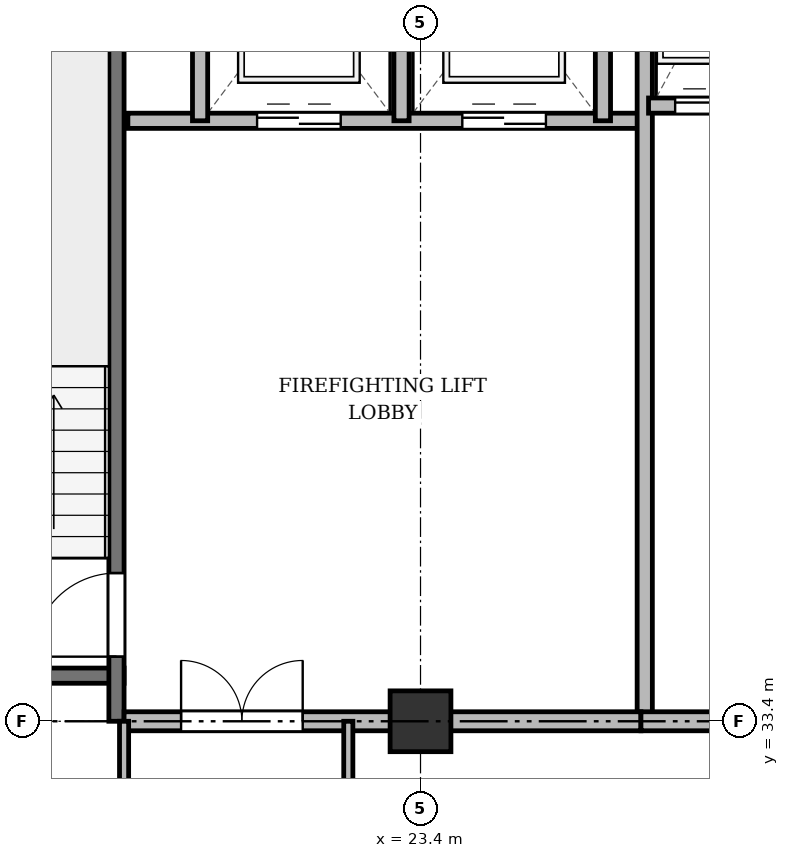
"""IFC4 building model, lengths in metres.
Left out: names, types, materials, properties, quantities, classifications, styles, units other than length and angle.
Written with IfcOpenShell. Run it as: python <this file> out.ifc"""

import sys

from ifc_helpers import new_model, si_unit, direction, frame, frame_2d, origin, origin_2d, place, context, subcontext, project, spatial, rectangle, extrude, source, transform, mapped, element, fill, save


model = new_model("IFC4")
c1 = context("Model", 3, precision=1e-05, world=origin(), true_north=direction((0.0, 1.0)))
c2 = subcontext(c1, "Body", "Model", "MODEL_VIEW")
j1 = project(units=[si_unit("LENGTHUNIT", "METRE"), si_unit("PLANEANGLEUNIT", "RADIAN")], contexts=[c1])
p1 = place(None, origin())
s1 = spatial("IfcSite", under=j1, at=p1, CompositionType="ELEMENT")
p2 = place(p1, origin())
s2 = spatial("IfcBuilding", under=s1, at=p2, CompositionType="ELEMENT")
p3 = place(p2, frame((0.0, 0.0, 106.9)))
s3 = spatial("IfcBuildingStorey", under=s2, at=p3, CompositionType="ELEMENT", Elevation=106.9)
m1 = source(origin(), c2, "Body", "SweptSolid", [
    extrude(rectangle(XDim=0.8, YDim=0.8, at=origin_2d()), origin(), (0.0, 0.0, 1.0), 3.6),
])
p4 = place(p3, frame((23.4, 33.4, 0.0), z_axis=(0.0, 0.0, 1.0), x_axis=(1.0, 0.0, 0.0)))
e1 = element("IfcColumn", 1, at=p4, inside=s3, PredefinedType="COLUMN", context=c2, shape_type="MappedRepresentation", body=[
    mapped(m1, transform((0.0, 0.0, 0.0), x_axis=(1.0, 0.0, 0.0), y_axis=(0.0, 1.0, 0.0), z_axis=(0.0, 0.0, 1.0), scale=1.0)),
])
p5 = place(p3, frame((16.1, 34.0, 0.0), z_axis=(0.0, 0.0, 1.0), x_axis=(1.0, 0.0, 0.0)))
e2 = element("IfcWall", 2, at=p5, inside=s3, PredefinedType="SHEAR", context=c2, shape_type="SweptSolid", body=[
    extrude(rectangle(XDim=3.4, YDim=0.2, at=frame_2d((1.7, 0.0))), origin(), (0.0, 0.0, 1.0), 3.34),
])
p6 = place(p3, frame((19.4, 33.4, 0.0), z_axis=(0.0, 0.0, 1.0), x_axis=(0.0, 1.0, 0.0)))
e3 = element("IfcWall", 3, at=p6, inside=s3, PredefinedType="SHEAR", context=c2, shape_type="SweptSolid", body=[
    extrude(rectangle(XDim=11.1, YDim=0.2, at=frame_2d((5.55, 0.0))), origin(), (0.0, 0.0, 1.0), 3.34),
])
p7 = place(p6, frame((0.85, 0.0, 0.0)))
e4 = element("IfcOpeningElement", 4, at=p7, cuts=e3, PredefinedType="OPENING", context=c2, shape_type="SweptSolid", body=[
    extrude(rectangle(XDim=1.1, YDim=2.15, at=frame_2d((0.55, 1.075))), frame((0.0, 0.11, 0.0), z_axis=(0.0, -1.0, 0.0), x_axis=(1.0, 0.0, 0.0)), (0.0, 0.0, 1.0), 0.22),
])
p8 = place(p3, frame((19.55, 41.3, 0.0), z_axis=(0.0, 0.0, 1.0), x_axis=(1.0, 0.0, 0.0)))
e5 = element("IfcWall", 5, at=p8, inside=s3, PredefinedType="SOLIDWALL", context=c2, shape_type="SweptSolid", body=[
    extrude(rectangle(XDim=6.75, YDim=0.2, at=frame_2d((3.375, 0.0))), origin(), (0.0, 0.0, 1.0), 3.34),
])
p9 = place(p8, frame((1.7, 0.0, 0.0)))
e6 = element("IfcOpeningElement", 6, at=p9, cuts=e5, PredefinedType="OPENING", context=c2, shape_type="SweptSolid", body=[
    extrude(rectangle(XDim=1.1, YDim=2.15, at=frame_2d((0.55, 1.075))), frame((0.0, 0.11, 0.0), z_axis=(0.0, -1.0, 0.0), x_axis=(1.0, 0.0, 0.0)), (0.0, 0.0, 1.0), 0.22),
])
p10 = place(p8, frame((4.4, 0.0, 0.0)))
e7 = element("IfcOpeningElement", 7, at=p10, cuts=e5, PredefinedType="OPENING", context=c2, shape_type="SweptSolid", body=[
    extrude(rectangle(XDim=1.1, YDim=2.15, at=frame_2d((0.55, 1.075))), frame((0.0, 0.11, 0.0), z_axis=(0.0, -1.0, 0.0), x_axis=(1.0, 0.0, 0.0)), (0.0, 0.0, 1.0), 0.22),
])
for number, where, z_axis, x_axis in (
    (8, (20.5, 41.3, 0.0), (0.0, 0.0, 1.0), (0.0, 1.0, 0.0)),
    (9, (23.15, 41.3, 0.0), (0.0, 0.0, 1.0), (0.0, 1.0, 0.0)),
    (10, (25.8, 41.3, 0.0), (0.0, 0.0, 1.0), (0.0, 1.0, 0.0)),
):
    element("IfcWall", number, at=place(p3, frame(where, z_axis=z_axis, x_axis=x_axis)), inside=s3, PredefinedType="SOLIDWALL", context=c2, shape_type="SweptSolid", body=[
        extrude(rectangle(XDim=3.4, YDim=0.2, at=frame_2d((1.7, 0.0))), origin(), (0.0, 0.0, 1.0), 3.34),
    ])
p11 = place(p3, frame((26.35, 33.4, 0.0), z_axis=(0.0, 0.0, 1.0), x_axis=(0.0, 1.0, 0.0)))
e11 = element("IfcWall", 11, at=p11, inside=s3, PredefinedType="SOLIDWALL", context=c2, shape_type="SweptSolid", body=[
    extrude(rectangle(XDim=11.3, YDim=0.2, at=frame_2d((5.65, 0.0))), origin(), (0.0, 0.0, 1.0), 2.752),
])
p12 = place(p3, frame((19.5, 33.4, 0.0), z_axis=(0.0, 0.0, 1.0), x_axis=(1.0, 0.0, 0.0)))
e12 = element("IfcWall", 12, at=p12, inside=s3, PredefinedType="PARTITIONING", context=c2, shape_type="SweptSolid", body=[
    extrude(rectangle(XDim=6.8, YDim=0.25, at=frame_2d((3.4, 0.0))), origin(), (0.0, 0.0, 1.0), 2.752),
])
p13 = place(p12, frame((0.75, 0.0, 0.0)))
e13 = element("IfcOpeningElement", 13, at=p13, cuts=e12, PredefinedType="OPENING", context=c2, shape_type="SweptSolid", body=[
    extrude(rectangle(XDim=1.6, YDim=2.2, at=frame_2d((0.8, 1.1))), frame((0.0, 0.135, 0.0), z_axis=(0.0, -1.0, 0.0), x_axis=(1.0, 0.0, 0.0)), (0.0, 0.0, 1.0), 0.27),
])
p14 = place(p3, frame((26.4, 41.5, 0.0), z_axis=(0.0, 0.0, 1.0), x_axis=(1.0, 0.0, 0.0)))
e14 = element("IfcWall", 14, at=p14, inside=s3, PredefinedType="SOLIDWALL", context=c2, shape_type="SweptSolid", body=[
    extrude(rectangle(XDim=6.95, YDim=0.2, at=frame_2d((3.475, 0.0))), origin(), (0.0, 0.0, 1.0), 3.34),
])
p15 = place(p14, frame((0.35, 0.0, 0.0)))
e15 = element("IfcOpeningElement", 15, at=p15, cuts=e14, PredefinedType="OPENING", context=c2, shape_type="SweptSolid", body=[
    extrude(rectangle(XDim=1.05, YDim=2.15, at=frame_2d((0.525, 1.075))), frame((0.0, 0.11, 0.0), z_axis=(0.0, -1.0, 0.0), x_axis=(1.0, 0.0, 0.0)), (0.0, 0.0, 1.0), 0.22),
])
p16 = place(p14, frame((2.05, 0.0, 0.0)))
e16 = element("IfcOpeningElement", 16, at=p16, cuts=e14, PredefinedType="OPENING", context=c2, shape_type="SweptSolid", body=[
    extrude(rectangle(XDim=1.05, YDim=2.15, at=frame_2d((0.525, 1.075))), frame((0.0, 0.11, 0.0), z_axis=(0.0, -1.0, 0.0), x_axis=(1.0, 0.0, 0.0)), (0.0, 0.0, 1.0), 0.22),
])
p17 = place(p14, frame((3.75, 0.0, 0.0)))
e17 = element("IfcOpeningElement", 17, at=p17, cuts=e14, PredefinedType="OPENING", context=c2, shape_type="SweptSolid", body=[
    extrude(rectangle(XDim=1.05, YDim=2.15, at=frame_2d((0.525, 1.075))), frame((0.0, 0.11, 0.0), z_axis=(0.0, -1.0, 0.0), x_axis=(1.0, 0.0, 0.0)), (0.0, 0.0, 1.0), 0.22),
])
p18 = place(p14, frame((5.45, 0.0, 0.0)))
e18 = element("IfcOpeningElement", 18, at=p18, cuts=e14, PredefinedType="OPENING", context=c2, shape_type="SweptSolid", body=[
    extrude(rectangle(XDim=1.05, YDim=2.15, at=frame_2d((0.525, 1.075))), frame((0.0, 0.11, 0.0), z_axis=(0.0, -1.0, 0.0), x_axis=(1.0, 0.0, 0.0)), (0.0, 0.0, 1.0), 0.22),
])
p19 = place(p3, frame((26.3, 33.4, 0.0), z_axis=(0.0, 0.0, 1.0), x_axis=(1.0, 0.0, 0.0)))
e19 = element("IfcWall", 19, at=p19, inside=s3, PredefinedType="PARTITIONING", context=c2, shape_type="SweptSolid", body=[
    extrude(rectangle(XDim=20.85, YDim=0.25, at=frame_2d((10.425, 0.0))), origin(), (0.0, 0.0, 1.0), 2.752),
])
p20 = place(p19, frame((9.2, 0.0, 0.0)))
e20 = element("IfcOpeningElement", 20, at=p20, cuts=e19, PredefinedType="OPENING", context=c2, shape_type="SweptSolid", body=[
    extrude(rectangle(XDim=1.6, YDim=2.2, at=frame_2d((0.8, 1.1))), frame((0.0, 0.135, 0.0), z_axis=(0.0, -1.0, 0.0), x_axis=(1.0, 0.0, 0.0)), (0.0, 0.0, 1.0), 0.27),
])
for number, where, z_axis, x_axis in (
    (21, (19.5, 29.8, 0.0), (0.0, 0.0, 1.0), (0.0, 1.0, 0.0)),
    (22, (22.45, 29.8, 0.0), (0.0, 0.0, 1.0), (0.0, 1.0, 0.0)),
):
    element("IfcWall", number, at=place(p3, frame(where, z_axis=z_axis, x_axis=x_axis)), inside=s3, PredefinedType="PARTITIONING", context=c2, shape_type="SweptSolid", body=[
        extrude(rectangle(XDim=3.6, YDim=0.12, at=frame_2d((1.8, 0.0))), origin(), (0.0, 0.0, 1.0), 2.752),
    ])
m2 = source(origin(), c2, "Body", "SweptSolid", [
    extrude(rectangle(XDim=1.1, YDim=2.15, at=frame_2d((0.55, 1.075))), frame((0.0, 0.025, 0.0), z_axis=(0.0, -1.0, 0.0), x_axis=(1.0, 0.0, 0.0)), (0.0, 0.0, 1.0), 0.05),
])
p21 = place(p7, origin())
e23 = element("IfcDoor", 23, at=p21, inside=s3, OperationType="SINGLE_SWING_LEFT", PredefinedType="DOOR", context=c2, shape_type="MappedRepresentation", body=[
    mapped(m2, transform((0.0, 0.0, 0.0), x_axis=(1.0, 0.0, 0.0), y_axis=(0.0, 1.0, 0.0), z_axis=(0.0, 0.0, 1.0), scale=1.0)),
])
fill(e4, e23)
p22 = place(p9, origin())
e24 = element("IfcDoor", 24, at=p22, inside=s3, OperationType="DOUBLE_DOOR_SLIDING", PredefinedType="DOOR", context=c2, shape_type="MappedRepresentation", body=[
    mapped(m2, transform((0.0, 0.0, 0.0), x_axis=(1.0, 0.0, 0.0), y_axis=(0.0, 1.0, 0.0), z_axis=(0.0, 0.0, 1.0), scale=1.0)),
])
fill(e6, e24)
p23 = place(p10, origin())
e25 = element("IfcDoor", 25, at=p23, inside=s3, OperationType="DOUBLE_DOOR_SLIDING", PredefinedType="DOOR", context=c2, shape_type="MappedRepresentation", body=[
    mapped(m2, transform((0.0, 0.0, 0.0), x_axis=(1.0, 0.0, 0.0), y_axis=(0.0, 1.0, 0.0), z_axis=(0.0, 0.0, 1.0), scale=1.0)),
])
fill(e7, e25)
m3 = source(origin(), c2, "Body", "SweptSolid", [
    extrude(rectangle(XDim=1.6, YDim=2.2, at=frame_2d((0.8, 1.1))), frame((0.0, 0.025, 0.0), z_axis=(0.0, -1.0, 0.0), x_axis=(1.0, 0.0, 0.0)), (0.0, 0.0, 1.0), 0.05),
])
p24 = place(p13, origin())
e26 = element("IfcDoor", 26, at=p24, inside=s3, OperationType="DOUBLE_DOOR_SINGLE_SWING", PredefinedType="DOOR", context=c2, shape_type="MappedRepresentation", body=[
    mapped(m3, transform((0.0, 0.0, 0.0), x_axis=(1.0, 0.0, 0.0), y_axis=(0.0, 1.0, 0.0), z_axis=(0.0, 0.0, 1.0), scale=1.0)),
])
fill(e13, e26)
m4 = source(origin(), c2, "Body", "SweptSolid", [
    extrude(rectangle(XDim=1.05, YDim=2.15, at=frame_2d((0.525, 1.075))), frame((0.0, 0.025, 0.0), z_axis=(0.0, -1.0, 0.0), x_axis=(1.0, 0.0, 0.0)), (0.0, 0.0, 1.0), 0.05),
])
p25 = place(p15, origin())
e27 = element("IfcDoor", 27, at=p25, inside=s3, OperationType="DOUBLE_DOOR_SLIDING", PredefinedType="DOOR", context=c2, shape_type="MappedRepresentation", body=[
    mapped(m4, transform((0.0, 0.0, 0.0), x_axis=(1.0, 0.0, 0.0), y_axis=(0.0, 1.0, 0.0), z_axis=(0.0, 0.0, 1.0), scale=1.0)),
])
fill(e15, e27)
save(model, sys.argv[1])
